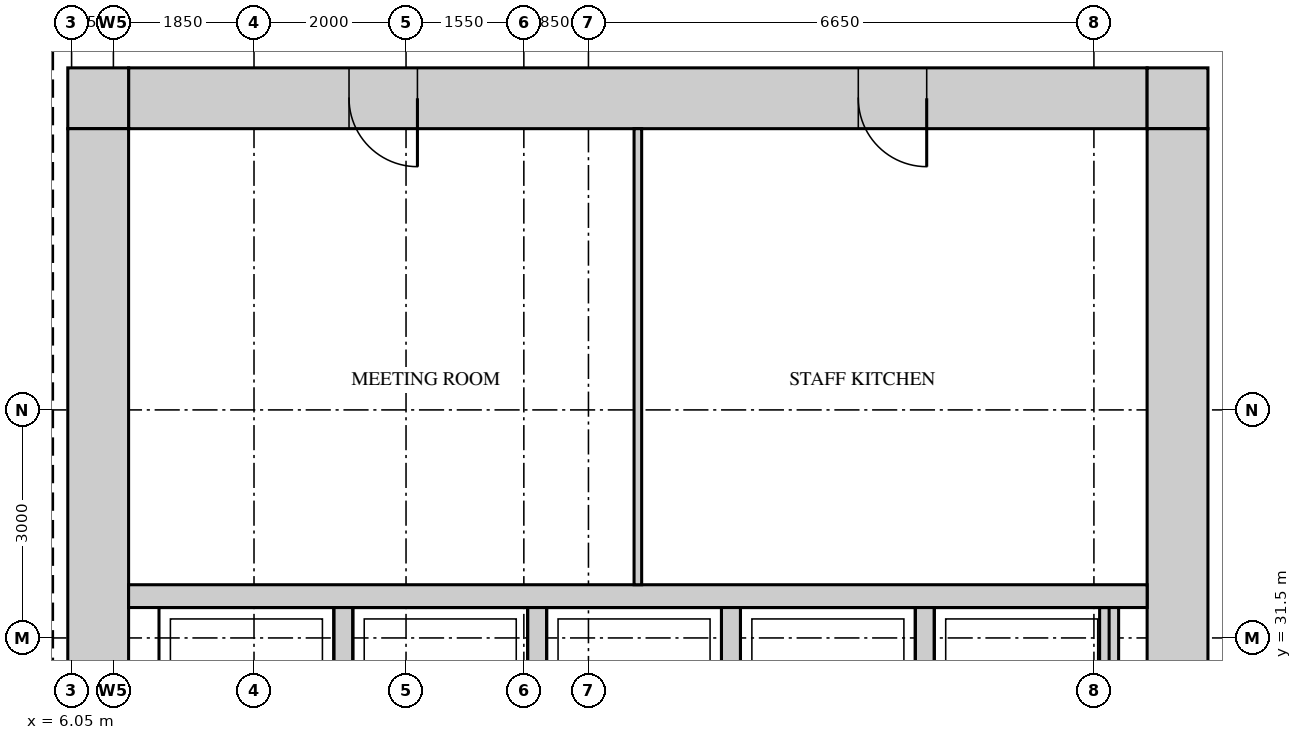
"""IFC4 building model, lengths in metres.
Left out: names, types, materials, properties, quantities, classifications, styles, units other than length and angle.
Written with IfcOpenShell. Run it as: python <this file> out.ifc"""

import sys

from ifc_helpers import new_model, si_unit, direction, frame, frame_2d, origin, place, context, subcontext, project, spatial, rectangle, extrude, source, transform, mapped, element, fill, save


model = new_model("IFC4")
c1 = context("Model", 3, precision=1e-05, world=origin(), true_north=direction((0.0, 1.0)))
c2 = subcontext(c1, "Body", "Model", "MODEL_VIEW")
j1 = project(units=[si_unit("LENGTHUNIT", "METRE"), si_unit("PLANEANGLEUNIT", "RADIAN")], contexts=[c1])
p1 = place(None, origin())
s1 = spatial("IfcSite", under=j1, at=p1, CompositionType="ELEMENT")
p2 = place(p1, origin())
s2 = spatial("IfcBuilding", under=s1, at=p2, CompositionType="ELEMENT")
p3 = place(p2, frame((0.0, 0.0, 172.7)))
s3 = spatial("IfcBuildingStorey", under=s2, at=p3, CompositionType="ELEMENT", Elevation=172.7)
m1 = source(origin(), c2, "Body", "SweptSolid", [
    extrude(rectangle(XDim=13.4, YDim=0.8, at=frame_2d((6.7, 0.0))), origin(), (0.0, 0.0, 1.0), 3.75),
])
p4 = place(p3, frame((6.8, 38.6, 0.0), z_axis=(0.0, 0.0, 1.0), x_axis=(1.0, 0.0, 0.0)))
e1 = element("IfcWall", 1, at=p4, inside=s3, PredefinedType="SHEAR", context=c2, shape_type="MappedRepresentation", body=[
    mapped(m1, transform((0.0, 0.0, 0.0))),
])
m2 = source(origin(), c2, "Body", "SweptSolid", [
    extrude(rectangle(XDim=0.9, YDim=2.1, at=frame_2d((0.45, 1.05))), frame((0.0, 0.41, 0.0), z_axis=(0.0, -1.0, 0.0), x_axis=(1.0, 0.0, 0.0)), (0.0, 0.0, 1.0), 0.82),
])
p5 = place(p4, frame((2.9, 0.0, 0.0)))
e2 = element("IfcOpeningElement", 2, at=p5, cuts=e1, PredefinedType="OPENING", context=c2, shape_type="MappedRepresentation", body=[
    mapped(m2, transform((0.0, 0.0, 0.0))),
])
p6 = place(p4, frame((9.6, 0.0, 0.0)))
e3 = element("IfcOpeningElement", 3, at=p6, cuts=e1, PredefinedType="OPENING", context=c2, shape_type="MappedRepresentation", body=[
    mapped(m2, transform((0.0, 0.0, 0.0))),
])
m3 = source(origin(), c2, "Body", "SweptSolid", [
    extrude(rectangle(XDim=0.8, YDim=0.8, at=frame_2d((0.4, 0.0))), origin(), (0.0, 0.0, 1.0), 3.75),
])
for number, where, z_axis, x_axis in (
    (4, (20.2, 38.6, 0.0), (0.0, 0.0, 1.0), (1.0, 0.0, 0.0)),
    (5, (6.0, 38.6, 0.0), (0.0, 0.0, 1.0), (1.0, 0.0, 0.0)),
):
    element("IfcWall", number, at=place(p3, frame(where, z_axis=z_axis, x_axis=x_axis)), inside=s3, PredefinedType="SHEAR", context=c2, shape_type="MappedRepresentation", body=[
        mapped(m3, transform((0.0, 0.0, 0.0))),
    ])
m4 = source(origin(), c2, "Body", "SweptSolid", [
    extrude(rectangle(XDim=22.4, YDim=0.8, at=frame_2d((11.2, 0.0))), origin(), (0.0, 0.0, 1.0), 3.75),
])
p7 = place(p3, frame((20.6, 15.8, 0.0), z_axis=(0.0, 0.0, 1.0), x_axis=(0.0, 1.0, 0.0)))
e6 = element("IfcWall", 6, at=p7, inside=s3, PredefinedType="SHEAR", context=c2, shape_type="MappedRepresentation", body=[
    mapped(m4, transform((0.0, 0.0, 0.0))),
])
m5 = source(origin(), c2, "Body", "SweptSolid", [
    extrude(rectangle(XDim=1.8, YDim=2.1, at=frame_2d((0.9, 1.05))), frame((0.0, 0.41, 0.0), z_axis=(0.0, -1.0, 0.0), x_axis=(1.0, 0.0, 0.0)), (0.0, 0.0, 1.0), 0.82),
])
p8 = place(p7, frame((10.7, 0.0, 0.0)))
e7 = element("IfcOpeningElement", 7, at=p8, cuts=e6, PredefinedType="OPENING", context=c2, shape_type="MappedRepresentation", body=[
    mapped(m5, transform((0.0, 0.0, 0.0))),
])
p9 = place(p7, frame((0.35, 0.0, 0.0)))
e8 = element("IfcOpeningElement", 8, at=p9, cuts=e6, PredefinedType="OPENING", context=c2, shape_type="MappedRepresentation", body=[
    mapped(m2, transform((0.0, 0.0, 0.0))),
])
p10 = place(p7, frame((2.8, 0.0, 0.0)))
e9 = element("IfcOpeningElement", 9, at=p10, cuts=e6, PredefinedType="OPENING", context=c2, shape_type="MappedRepresentation", body=[
    mapped(m2, transform((0.0, 0.0, 0.0))),
])
p11 = place(p7, frame((5.55, 0.0, 0.0)))
e10 = element("IfcOpeningElement", 10, at=p11, cuts=e6, PredefinedType="OPENING", context=c2, shape_type="MappedRepresentation", body=[
    mapped(m2, transform((0.0, 0.0, 0.0))),
])
p12 = place(p3, frame((6.4, 15.8, 0.0), z_axis=(0.0, 0.0, 1.0), x_axis=(0.0, 1.0, 0.0)))
e11 = element("IfcWall", 11, at=p12, inside=s3, PredefinedType="SHEAR", context=c2, shape_type="MappedRepresentation", body=[
    mapped(m4, transform((0.0, 0.0, 0.0))),
])
m6 = source(origin(), c2, "Body", "SweptSolid", [
    extrude(rectangle(XDim=13.4, YDim=0.3, at=frame_2d((6.7, 0.0))), origin(), (0.0, 0.0, 1.0), 3.75),
])
p13 = place(p3, frame((6.8, 32.05, 0.0), z_axis=(0.0, 0.0, 1.0), x_axis=(1.0, 0.0, 0.0)))
e12 = element("IfcWall", 12, at=p13, inside=s3, PredefinedType="STANDARD", context=c2, shape_type="MappedRepresentation", body=[
    mapped(m6, transform((0.0, 0.0, 0.0))),
])
m7 = source(origin(), c2, "Body", "SweptSolid", [
    extrude(rectangle(XDim=2.4, YDim=0.25, at=frame_2d((1.2, 0.0))), origin(), (0.0, 0.0, 1.0), 3.75),
])
for number, where, z_axis, x_axis in (
    (13, (17.275, 29.5, 0.0), (0.0, 0.0, 1.0), (0.0, 1.0, 0.0)),
    (14, (19.7, 29.5, 0.0), (0.0, 0.0, 1.0), (0.0, 1.0, 0.0)),
    (15, (9.625, 29.5, 0.0), (0.0, 0.0, 1.0), (0.0, 1.0, 0.0)),
    (16, (12.175, 29.5, 0.0), (0.0, 0.0, 1.0), (0.0, 1.0, 0.0)),
    (17, (14.725, 29.5, 0.0), (0.0, 0.0, 1.0), (0.0, 1.0, 0.0)),
):
    element("IfcWall", number, at=place(p3, frame(where, z_axis=z_axis, x_axis=x_axis)), inside=s3, PredefinedType="STANDARD", context=c2, shape_type="MappedRepresentation", body=[
        mapped(m7, transform((0.0, 0.0, 0.0))),
    ])
m8 = source(origin(), c2, "Body", "SweptSolid", [
    extrude(rectangle(XDim=6.0, YDim=0.1, at=frame_2d((3.0, 0.0))), origin(), (0.0, 0.0, 1.0), 3.8),
])
p14 = place(p3, frame((13.5, 32.2, 0.0), z_axis=(0.0, 0.0, 1.0), x_axis=(0.0, 1.0, 0.0)))
e18 = element("IfcWall", 18, at=p14, inside=s3, PredefinedType="PARTITIONING", context=c2, shape_type="MappedRepresentation", body=[
    mapped(m8, transform((0.0, 0.0, 0.0))),
])
m9 = source(origin(), c2, "Body", "SweptSolid", [
    extrude(rectangle(XDim=0.9, YDim=2.1, at=frame_2d((0.45, 1.05))), frame((0.0, 0.35, 0.0), z_axis=(0.0, -1.0, 0.0), x_axis=(1.0, 0.0, 0.0)), (0.0, 0.0, 1.0), 0.7),
])
p15 = place(p5, origin())
e19 = element("IfcDoor", 19, at=p15, inside=s3, OperationType="SINGLE_SWING_RIGHT", PredefinedType="DOOR", context=c2, shape_type="MappedRepresentation", body=[
    mapped(m9, transform((0.0, 0.0, 0.0))),
])
fill(e2, e19)
p16 = place(p6, origin())
e20 = element("IfcDoor", 20, at=p16, inside=s3, OperationType="SINGLE_SWING_RIGHT", PredefinedType="DOOR", context=c2, shape_type="MappedRepresentation", body=[
    mapped(m9, transform((0.0, 0.0, 0.0))),
])
fill(e3, e20)
save(model, sys.argv[1])
